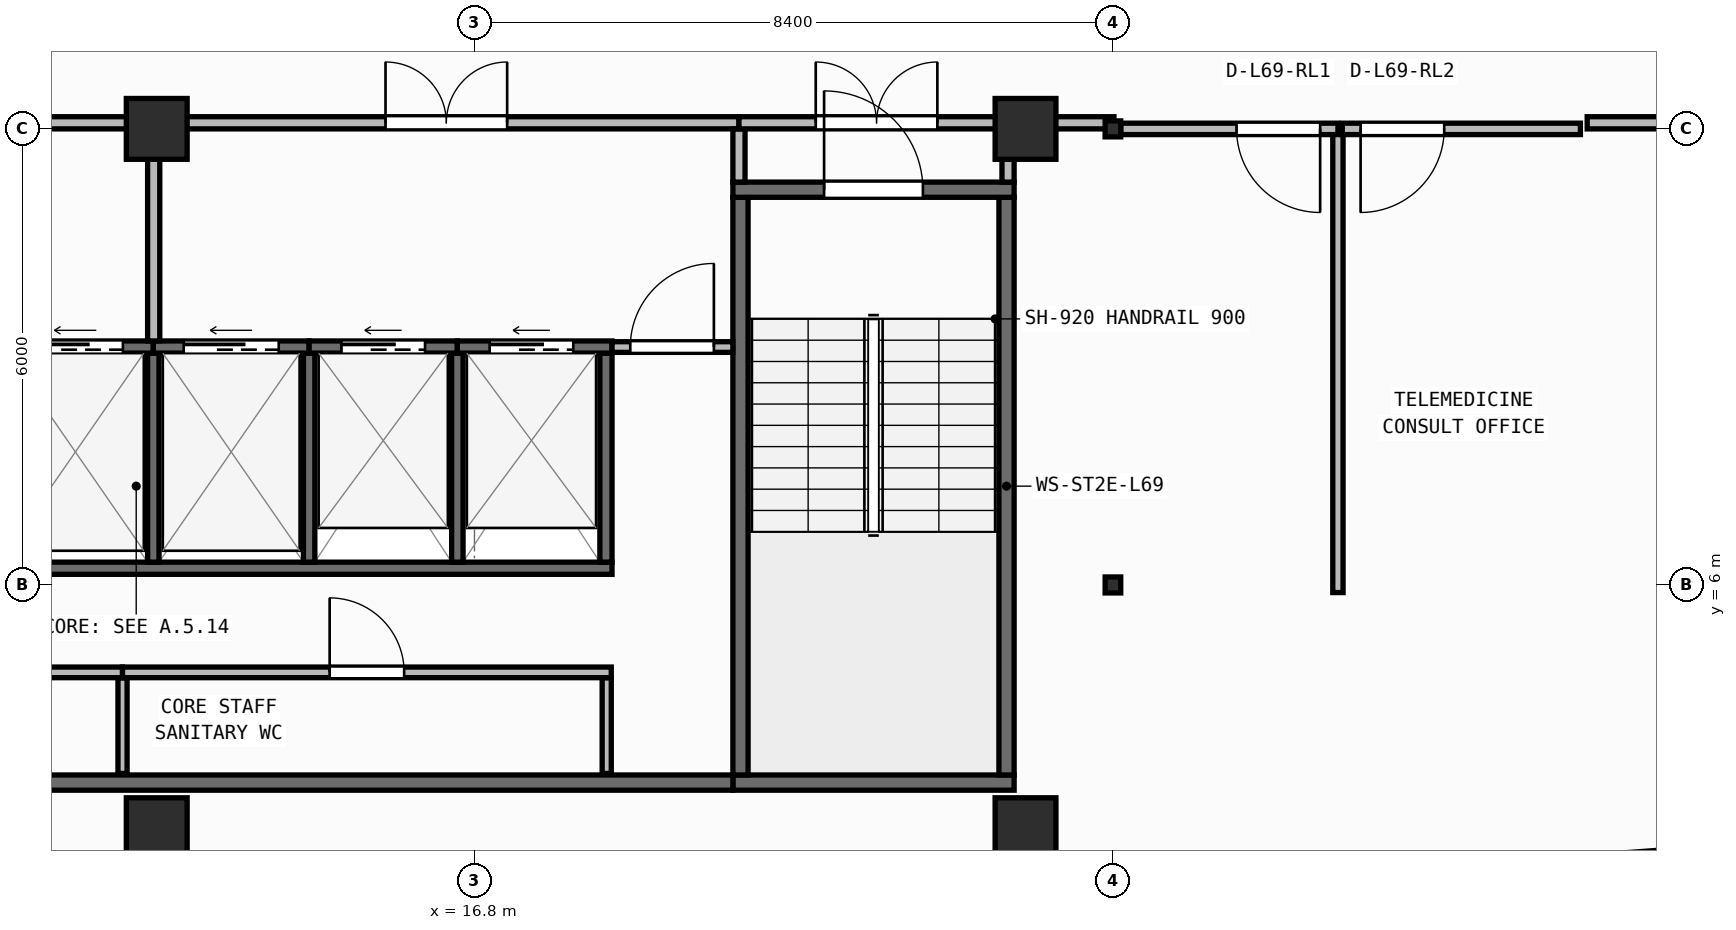
"""IFC4 building model, lengths in metres.
Left out: names, types, materials, properties, quantities, classifications, styles, units other than length and angle.
Written with IfcOpenShell. Run it as: python <this file> out.ifc"""

import sys

from ifc_helpers import new_model, si_unit, direction, frame, frame_2d, origin, origin_2d, place, context, subcontext, project, spatial, rectangle, i_section, extrude, element, fill, save


model = new_model("IFC4")
c1 = context("Model", 3, precision=1e-05, world=origin(), true_north=direction((0.0, 1.0)))
c2 = subcontext(c1, "Body", "Model", "MODEL_VIEW")
j1 = project(units=[si_unit("LENGTHUNIT", "METRE"), si_unit("PLANEANGLEUNIT", "RADIAN")], contexts=[c1])
p1 = place(None, origin())
s1 = spatial("IfcSite", under=j1, at=p1, CompositionType="ELEMENT")
p2 = place(p1, origin())
s2 = spatial("IfcBuilding", under=s1, at=p2, CompositionType="ELEMENT")
p3 = place(p2, frame((0.0, 0.0, 280.25)))
s3 = spatial("IfcBuildingStorey", under=s2, at=p3, CompositionType="ELEMENT", Elevation=280.25)
for number, where, z_axis, x_axis in (
    (1, (12.62, 2.8, 0.0), (0.0, 0.0, 1.0), (1.0, 0.0, 0.0)),
    (2, (24.05, 2.8, 0.0), (0.0, 0.0, 1.0), (1.0, 0.0, 0.0)),
):
    element("IfcColumn", number, at=place(p3, frame(where, z_axis=z_axis, x_axis=x_axis)), inside=s3, PredefinedType="COLUMN", context=c2, shape_type="SweptSolid", body=[
        extrude(rectangle(XDim=0.8, YDim=0.8, at=origin_2d()), origin(), (0.0, 0.0, 1.0), 3.95),
    ])
p4 = place(p3, frame((25.2, 6.0, 0.0), z_axis=(0.0, 0.0, 1.0), x_axis=(1.0, 0.0, 0.0)))
e3 = element("IfcColumn", 3, at=p4, inside=s3, PredefinedType="COLUMN", context=c2, shape_type="SweptSolid", body=[
    extrude(i_section(OverallWidth=0.205, OverallDepth=0.21, WebThickness=0.009, FlangeThickness=0.014, FilletRadius=0.011, at=origin_2d()), origin(), (0.0, 0.0, 1.0), 3.95),
])
for number, where, z_axis, x_axis in (
    (4, (12.62, 12.0, 0.0), (0.0, 0.0, 1.0), (1.0, 0.0, 0.0)),
    (5, (24.05, 12.0, 0.0), (0.0, 0.0, 1.0), (1.0, 0.0, 0.0)),
):
    element("IfcColumn", number, at=place(p3, frame(where, z_axis=z_axis, x_axis=x_axis)), inside=s3, PredefinedType="COLUMN", context=c2, shape_type="SweptSolid", body=[
        extrude(rectangle(XDim=0.8, YDim=0.8, at=origin_2d()), origin(), (0.0, 0.0, 1.0), 3.95),
    ])
p5 = place(p3, frame((25.2, 12.0, 0.0), z_axis=(0.0, 0.0, 1.0), x_axis=(1.0, 0.0, 0.0)))
e6 = element("IfcColumn", 6, at=p5, inside=s3, PredefinedType="COLUMN", context=c2, shape_type="SweptSolid", body=[
    extrude(i_section(OverallWidth=0.205, OverallDepth=0.21, WebThickness=0.009, FlangeThickness=0.014, FilletRadius=0.011, at=origin_2d()), origin(), (0.0, 0.0, 1.0), 3.95),
])
p6 = place(p3, frame((2.46, 0.172, 0.0), z_axis=(0.0, 0.0, 1.0), x_axis=(0.997289775118, 0.073573802713, 0.0)))
e7 = element("IfcWall", 7, at=p6, inside=s3, PredefinedType="STANDARD", context=c2, shape_type="SweptSolid", body=[
    extrude(rectangle(XDim=36.379, YDim=0.26, at=frame_2d((18.189, 0.0))), origin(), (0.0, 0.0, 1.0), 3.71),
])
p7 = place(p6, frame((16.989, 0.0, 0.9)))
e8 = element("IfcOpeningElement", 8, at=p7, cuts=e7, PredefinedType="OPENING", context=c2, shape_type="SweptSolid", body=[
    extrude(rectangle(XDim=2.4, YDim=1.65, at=frame_2d((1.2, 0.825))), frame((0.0, 0.14, 0.0), z_axis=(0.0, -1.0, 0.0), x_axis=(1.0, 0.0, 0.0)), (0.0, 0.0, 1.0), 0.28),
])
p8 = place(p3, frame((20.2, 3.4, 0.0), z_axis=(0.0, 0.0, 1.0), x_axis=(1.0, 0.0, 0.0)))
e9 = element("IfcWall", 9, at=p8, inside=s3, PredefinedType="SHEAR", context=c2, shape_type="SweptSolid", body=[
    extrude(rectangle(XDim=3.7, YDim=0.2, at=frame_2d((1.85, 0.0))), origin(), (0.0, 0.0, 1.0), 3.71),
])
for number, where, z_axis, x_axis in (
    (10, (20.3, 3.5, 0.0), (0.0, 0.0, 1.0), (0.0, 1.0, 0.0)),
    (11, (23.8, 3.5, 0.0), (0.0, 0.0, 1.0), (0.0, 1.0, 0.0)),
):
    element("IfcWall", number, at=place(p3, frame(where, z_axis=z_axis, x_axis=x_axis)), inside=s3, PredefinedType="SHEAR", context=c2, shape_type="SweptSolid", body=[
        extrude(rectangle(XDim=7.6, YDim=0.2, at=frame_2d((3.8, 0.0))), origin(), (0.0, 0.0, 1.0), 3.71),
    ])
p9 = place(p3, frame((20.2, 11.2, 0.0), z_axis=(0.0, 0.0, 1.0), x_axis=(1.0, 0.0, 0.0)))
e12 = element("IfcWall", 12, at=p9, inside=s3, PredefinedType="SHEAR", context=c2, shape_type="SweptSolid", body=[
    extrude(rectangle(XDim=3.7, YDim=0.2, at=frame_2d((1.85, 0.0))), origin(), (0.0, 0.0, 1.0), 3.71),
])
p10 = place(p9, frame((1.2, 0.0, 0.0)))
e13 = element("IfcOpeningElement", 13, at=p10, cuts=e12, PredefinedType="OPENING", context=c2, shape_type="SweptSolid", body=[
    extrude(rectangle(XDim=1.3, YDim=2.15, at=frame_2d((0.65, 1.075))), frame((0.0, 0.11, 0.0), z_axis=(0.0, -1.0, 0.0), x_axis=(1.0, 0.0, 0.0)), (0.0, 0.0, 1.0), 0.22),
])
p11 = place(p3, frame((6.5, 3.4, 0.0), z_axis=(0.0, 0.0, 1.0), x_axis=(1.0, 0.0, 0.0)))
e14 = element("IfcWall", 14, at=p11, inside=s3, PredefinedType="SHEAR", context=c2, shape_type="SweptSolid", body=[
    extrude(rectangle(XDim=13.7, YDim=0.2, at=frame_2d((6.85, 0.0))), origin(), (0.0, 0.0, 1.0), 3.71),
])
p12 = place(p3, frame((6.5, 6.22, 0.0), z_axis=(0.0, 0.0, 1.0), x_axis=(1.0, 0.0, 0.0)))
e15 = element("IfcWall", 15, at=p12, inside=s3, PredefinedType="SHEAR", context=c2, shape_type="SweptSolid", body=[
    extrude(rectangle(XDim=12.11, YDim=0.16, at=frame_2d((6.055, 0.0))), origin(), (0.0, 0.0, 1.0), 3.71),
])
p13 = place(p3, frame((18.53, 6.3, 0.0), z_axis=(0.0, 0.0, 1.0), x_axis=(0.0, 1.0, 0.0)))
e16 = element("IfcWall", 16, at=p13, inside=s3, PredefinedType="SHEAR", context=c2, shape_type="SweptSolid", body=[
    extrude(rectangle(XDim=2.75, YDim=0.16, at=frame_2d((1.375, 0.0))), origin(), (0.0, 0.0, 1.0), 3.71),
])
for number, where, z_axis, x_axis in (
    (17, (12.575, 6.3, 0.0), (0.0, 0.0, 1.0), (0.0, 1.0, 0.0)),
    (18, (14.625, 6.3, 0.0), (0.0, 0.0, 1.0), (0.0, 1.0, 0.0)),
    (19, (16.575, 6.3, 0.0), (0.0, 0.0, 1.0), (0.0, 1.0, 0.0)),
):
    element("IfcWall", number, at=place(p3, frame(where, z_axis=z_axis, x_axis=x_axis)), inside=s3, PredefinedType="SHEAR", context=c2, shape_type="SweptSolid", body=[
        extrude(rectangle(XDim=2.75, YDim=0.15, at=frame_2d((1.375, 0.0))), origin(), (0.0, 0.0, 1.0), 3.71),
    ])
p14 = place(p3, frame((10.525, 9.13, 0.0), z_axis=(0.0, 0.0, 1.0), x_axis=(1.0, 0.0, 0.0)))
e20 = element("IfcWall", 20, at=p14, inside=s3, PredefinedType="SHEAR", context=c2, shape_type="SweptSolid", body=[
    extrude(rectangle(XDim=2.05, YDim=0.16, at=frame_2d((1.025, 0.0))), origin(), (0.0, 0.0, 1.0), 3.71),
])
p15 = place(p14, frame((0.4, 0.0, 0.0)))
e21 = element("IfcOpeningElement", 21, at=p15, cuts=e20, PredefinedType="OPENING", context=c2, shape_type="SweptSolid", body=[
    extrude(rectangle(XDim=1.25, YDim=2.15, at=frame_2d((0.625, 1.075))), frame((0.0, 0.09, 0.0), z_axis=(0.0, -1.0, 0.0), x_axis=(1.0, 0.0, 0.0)), (0.0, 0.0, 1.0), 0.18),
])
p16 = place(p3, frame((12.575, 9.13, 0.0), z_axis=(0.0, 0.0, 1.0), x_axis=(1.0, 0.0, 0.0)))
e22 = element("IfcWall", 22, at=p16, inside=s3, PredefinedType="SHEAR", context=c2, shape_type="SweptSolid", body=[
    extrude(rectangle(XDim=2.05, YDim=0.16, at=frame_2d((1.025, 0.0))), origin(), (0.0, 0.0, 1.0), 3.71),
])
p17 = place(p16, frame((0.4, 0.0, 0.0)))
e23 = element("IfcOpeningElement", 23, at=p17, cuts=e22, PredefinedType="OPENING", context=c2, shape_type="SweptSolid", body=[
    extrude(rectangle(XDim=1.25, YDim=2.15, at=frame_2d((0.625, 1.075))), frame((0.0, 0.09, 0.0), z_axis=(0.0, -1.0, 0.0), x_axis=(1.0, 0.0, 0.0)), (0.0, 0.0, 1.0), 0.18),
])
p18 = place(p3, frame((14.625, 9.13, 0.0), z_axis=(0.0, 0.0, 1.0), x_axis=(1.0, 0.0, 0.0)))
e24 = element("IfcWall", 24, at=p18, inside=s3, PredefinedType="SHEAR", context=c2, shape_type="SweptSolid", body=[
    extrude(rectangle(XDim=1.95, YDim=0.16, at=frame_2d((0.975, 0.0))), origin(), (0.0, 0.0, 1.0), 3.71),
])
p19 = place(p18, frame((0.425, 0.0, 0.0)))
e25 = element("IfcOpeningElement", 25, at=p19, cuts=e24, PredefinedType="OPENING", context=c2, shape_type="SweptSolid", body=[
    extrude(rectangle(XDim=1.1, YDim=2.15, at=frame_2d((0.55, 1.075))), frame((0.0, 0.09, 0.0), z_axis=(0.0, -1.0, 0.0), x_axis=(1.0, 0.0, 0.0)), (0.0, 0.0, 1.0), 0.18),
])
p20 = place(p3, frame((16.575, 9.13, 0.0), z_axis=(0.0, 0.0, 1.0), x_axis=(1.0, 0.0, 0.0)))
e26 = element("IfcWall", 26, at=p20, inside=s3, PredefinedType="SHEAR", context=c2, shape_type="SweptSolid", body=[
    extrude(rectangle(XDim=2.035, YDim=0.16, at=frame_2d((1.018, 0.0))), origin(), (0.0, 0.0, 1.0), 3.71),
])
p21 = place(p20, frame((0.425, 0.0, 0.0)))
e27 = element("IfcOpeningElement", 27, at=p21, cuts=e26, PredefinedType="OPENING", context=c2, shape_type="SweptSolid", body=[
    extrude(rectangle(XDim=1.1, YDim=2.15, at=frame_2d((0.55, 1.075))), frame((0.0, 0.09, 0.0), z_axis=(0.0, -1.0, 0.0), x_axis=(1.0, 0.0, 0.0)), (0.0, 0.0, 1.0), 0.18),
])
for number, where, z_axis, x_axis in (
    (28, (12.17, 3.52, 0.0), (0.0, 0.0, 1.0), (0.0, 1.0, 0.0)),
    (29, (18.54, 3.52, 0.0), (0.0, 0.0, 1.0), (0.0, 1.0, 0.0)),
):
    element("IfcWall", number, at=place(p3, frame(where, z_axis=z_axis, x_axis=x_axis)), inside=s3, PredefinedType="PARTITIONING", context=c2, shape_type="SweptSolid", body=[
        extrude(rectangle(XDim=1.26, YDim=0.12, at=frame_2d((0.63, 0.0))), origin(), (0.0, 0.0, 1.0), 3.71),
    ])
p22 = place(p3, frame((6.5, 4.85, 0.0), z_axis=(0.0, 0.0, 1.0), x_axis=(1.0, 0.0, 0.0)))
e30 = element("IfcWall", 30, at=p22, inside=s3, PredefinedType="PARTITIONING", context=c2, shape_type="SweptSolid", body=[
    extrude(rectangle(XDim=5.67, YDim=0.14, at=frame_2d((2.835, 0.0))), origin(), (0.0, 0.0, 1.0), 3.71),
])
p23 = place(p22, frame((2.285, 0.0, 0.0)))
e31 = element("IfcOpeningElement", 31, at=p23, cuts=e30, PredefinedType="OPENING", context=c2, shape_type="SweptSolid", body=[
    extrude(rectangle(XDim=1.1, YDim=2.1, at=frame_2d((0.55, 1.05))), frame((0.0, 0.08, 0.0), z_axis=(0.0, -1.0, 0.0), x_axis=(1.0, 0.0, 0.0)), (0.0, 0.0, 1.0), 0.16),
])
p24 = place(p3, frame((12.17, 4.85, 0.0), z_axis=(0.0, 0.0, 1.0), x_axis=(1.0, 0.0, 0.0)))
e32 = element("IfcWall", 32, at=p24, inside=s3, PredefinedType="PARTITIONING", context=c2, shape_type="SweptSolid", body=[
    extrude(rectangle(XDim=6.43, YDim=0.14, at=frame_2d((3.215, 0.0))), origin(), (0.0, 0.0, 1.0), 3.71),
])
p25 = place(p24, frame((2.725, 0.0, 0.0)))
e33 = element("IfcOpeningElement", 33, at=p25, cuts=e32, PredefinedType="OPENING", context=c2, shape_type="SweptSolid", body=[
    extrude(rectangle(XDim=0.98, YDim=2.1, at=frame_2d((0.49, 1.05))), frame((0.0, 0.08, 0.0), z_axis=(0.0, -1.0, 0.0), x_axis=(1.0, 0.0, 0.0)), (0.0, 0.0, 1.0), 0.16),
])
p26 = place(p3, frame((18.61, 9.13, 0.0), z_axis=(0.0, 0.0, 1.0), x_axis=(1.0, 0.0, 0.0)))
e34 = element("IfcWall", 34, at=p26, inside=s3, PredefinedType="PARTITIONING", context=c2, shape_type="SweptSolid", body=[
    extrude(rectangle(XDim=1.59, YDim=0.14, at=frame_2d((0.795, 0.0))), origin(), (0.0, 0.0, 1.0), 3.71),
])
p27 = place(p26, frame((0.24, 0.0, 0.0)))
e35 = element("IfcOpeningElement", 35, at=p27, cuts=e34, PredefinedType="OPENING", context=c2, shape_type="SweptSolid", body=[
    extrude(rectangle(XDim=1.1, YDim=2.1, at=frame_2d((0.55, 1.05))), frame((0.0, 0.08, 0.0), z_axis=(0.0, -1.0, 0.0), x_axis=(1.0, 0.0, 0.0)), (0.0, 0.0, 1.0), 0.16),
])
p28 = place(p3, frame((6.4, 12.08, 0.0), z_axis=(0.0, 0.0, 1.0), x_axis=(1.0, 0.0, 0.0)))
e36 = element("IfcWall", 36, at=p28, inside=s3, PredefinedType="PARTITIONING", context=c2, shape_type="SweptSolid", body=[
    extrude(rectangle(XDim=6.18, YDim=0.16, at=frame_2d((3.09, 0.0))), origin(), (0.0, 0.0, 1.0), 3.157),
])
p29 = place(p28, frame((2.29, 0.0, 0.0)))
e37 = element("IfcOpeningElement", 37, at=p29, cuts=e36, PredefinedType="OPENING", context=c2, shape_type="SweptSolid", body=[
    extrude(rectangle(XDim=1.6, YDim=2.05, at=frame_2d((0.8, 1.025))), frame((0.0, 0.09, 0.0), z_axis=(0.0, -1.0, 0.0), x_axis=(1.0, 0.0, 0.0)), (0.0, 0.0, 1.0), 0.18),
])
p30 = place(p3, frame((12.58, 9.21, 0.0), z_axis=(0.0, 0.0, 1.0), x_axis=(0.0, 1.0, 0.0)))
e38 = element("IfcWall", 38, at=p30, inside=s3, PredefinedType="PARTITIONING", context=c2, shape_type="SweptSolid", body=[
    extrude(rectangle(XDim=2.79, YDim=0.16, at=frame_2d((1.395, 0.0))), origin(), (0.0, 0.0, 1.0), 3.71),
])
p31 = place(p3, frame((12.58, 12.08, 0.0), z_axis=(0.0, 0.0, 1.0), x_axis=(1.0, 0.0, 0.0)))
e39 = element("IfcWall", 39, at=p31, inside=s3, PredefinedType="PARTITIONING", context=c2, shape_type="SweptSolid", body=[
    extrude(rectangle(XDim=7.7, YDim=0.16, at=frame_2d((3.85, 0.0))), origin(), (0.0, 0.0, 1.0), 3.157),
])
p32 = place(p31, frame((3.05, 0.0, 0.0)))
e40 = element("IfcOpeningElement", 40, at=p32, cuts=e39, PredefinedType="OPENING", context=c2, shape_type="SweptSolid", body=[
    extrude(rectangle(XDim=1.6, YDim=2.05, at=frame_2d((0.8, 1.025))), frame((0.0, 0.09, 0.0), z_axis=(0.0, -1.0, 0.0), x_axis=(1.0, 0.0, 0.0)), (0.0, 0.0, 1.0), 0.18),
])
p33 = place(p3, frame((20.28, 11.3, 0.0), z_axis=(0.0, 0.0, 1.0), x_axis=(0.0, 1.0, 0.0)))
e41 = element("IfcWall", 41, at=p33, inside=s3, PredefinedType="PARTITIONING", context=c2, shape_type="SweptSolid", body=[
    extrude(rectangle(XDim=0.7, YDim=0.16, at=frame_2d((0.35, 0.0))), origin(), (0.0, 0.0, 1.0), 3.71),
])
p34 = place(p3, frame((20.28, 12.08, 0.0), z_axis=(0.0, 0.0, 1.0), x_axis=(1.0, 0.0, 0.0)))
e42 = element("IfcWall", 42, at=p34, inside=s3, PredefinedType="PARTITIONING", context=c2, shape_type="SweptSolid", body=[
    extrude(rectangle(XDim=3.62, YDim=0.16, at=frame_2d((1.81, 0.0))), origin(), (0.0, 0.0, 1.0), 3.157),
])
p35 = place(p34, frame((1.01, 0.0, 0.0)))
e43 = element("IfcOpeningElement", 43, at=p35, cuts=e42, PredefinedType="OPENING", context=c2, shape_type="SweptSolid", body=[
    extrude(rectangle(XDim=1.6, YDim=2.05, at=frame_2d((0.8, 1.025))), frame((0.0, 0.09, 0.0), z_axis=(0.0, -1.0, 0.0), x_axis=(1.0, 0.0, 0.0)), (0.0, 0.0, 1.0), 0.18),
])
p36 = place(p3, frame((23.82, 11.3, 0.0), z_axis=(0.0, 0.0, 1.0), x_axis=(0.0, 1.0, 0.0)))
e44 = element("IfcWall", 44, at=p36, inside=s3, PredefinedType="PARTITIONING", context=c2, shape_type="SweptSolid", body=[
    extrude(rectangle(XDim=0.7, YDim=0.16, at=frame_2d((0.35, 0.0))), origin(), (0.0, 0.0, 1.0), 3.71),
])
p37 = place(p3, frame((28.16, 5.9, 0.0), z_axis=(0.0, 0.0, 1.0), x_axis=(0.0, 1.0, 0.0)))
e45 = element("IfcWall", 45, at=p37, inside=s3, PredefinedType="PARTITIONING", context=c2, shape_type="SweptSolid", body=[
    extrude(rectangle(XDim=6.1, YDim=0.135, at=frame_2d((3.05, 0.0))), origin(), (0.0, 0.0, 1.0), 3.71),
])
p38 = place(p3, frame((28.16, 12.0, 0.0), z_axis=(0.0, 0.0, 1.0), x_axis=(-1.0, 0.0, 0.0)))
e46 = element("IfcWall", 46, at=p38, inside=s3, PredefinedType="PARTITIONING", context=c2, shape_type="SweptSolid", body=[
    extrude(rectangle(XDim=2.857, YDim=0.15, at=frame_2d((1.429, 0.0))), origin(), (0.0, 0.0, 1.0), 3.157),
])
p39 = place(p38, frame((0.234, 0.0, 0.0)))
e47 = element("IfcOpeningElement", 47, at=p39, cuts=e46, PredefinedType="OPENING", context=c2, shape_type="SweptSolid", body=[
    extrude(rectangle(XDim=1.1, YDim=2.1, at=frame_2d((0.55, 1.05))), frame((0.0, 0.085, 0.0), z_axis=(0.0, -1.0, 0.0), x_axis=(1.0, 0.0, 0.0)), (0.0, 0.0, 1.0), 0.17),
])
p40 = place(p3, frame((31.35, 12.0, 0.0), z_axis=(0.0, 0.0, 1.0), x_axis=(-1.0, 0.0, 0.0)))
e48 = element("IfcWall", 48, at=p40, inside=s3, PredefinedType="PARTITIONING", context=c2, shape_type="SweptSolid", body=[
    extrude(rectangle(XDim=3.133, YDim=0.15, at=frame_2d((1.566, 0.0))), origin(), (0.0, 0.0, 1.0), 3.157),
])
p41 = place(p40, frame((1.792, 0.0, 0.0)))
e49 = element("IfcOpeningElement", 49, at=p41, cuts=e48, PredefinedType="OPENING", context=c2, shape_type="SweptSolid", body=[
    extrude(rectangle(XDim=1.1, YDim=2.1, at=frame_2d((0.55, 1.05))), frame((0.0, 0.085, 0.0), z_axis=(0.0, -1.0, 0.0), x_axis=(1.0, 0.0, 0.0)), (0.0, 0.0, 1.0), 0.17),
])
p42 = place(p3, frame((24.02, 12.08, 0.0), z_axis=(0.0, 0.0, 1.0), x_axis=(1.0, 0.0, 0.0)))
e50 = element("IfcWall", 50, at=p42, inside=s3, PredefinedType="PARTITIONING", context=c2, shape_type="SweptSolid", body=[
    extrude(rectangle(XDim=1.193, YDim=0.16, at=frame_2d((0.597, 0.0))), origin(), (0.0, 0.0, 1.0), 3.157),
])
p43 = place(p3, frame((31.439, 12.08, 0.0), z_axis=(0.0, 0.0, 1.0), x_axis=(1.0, 0.0, 0.0)))
e51 = element("IfcWall", 51, at=p43, inside=s3, PredefinedType="PARTITIONING", context=c2, shape_type="SweptSolid", body=[
    extrude(rectangle(XDim=2.174, YDim=0.16, at=frame_2d((1.087, 0.0))), origin(), (0.0, 0.0, 1.0), 3.157),
])
p44 = place(p10, origin())
e52 = element("IfcDoor", 52, at=p44, inside=s3, OperationType="SINGLE_SWING_LEFT", PredefinedType="DOOR", context=c2, shape_type="SweptSolid", body=[
    extrude(rectangle(XDim=1.3, YDim=2.15, at=frame_2d((0.65, 1.075))), frame((0.0, 0.025, 0.0), z_axis=(0.0, -1.0, 0.0), x_axis=(1.0, 0.0, 0.0)), (0.0, 0.0, 1.0), 0.05),
])
fill(e13, e52)
p45 = place(p15, origin())
e53 = element("IfcDoor", 53, at=p45, inside=s3, OperationType="SLIDING_TO_LEFT", PredefinedType="DOOR", context=c2, shape_type="SweptSolid", body=[
    extrude(rectangle(XDim=1.25, YDim=2.15, at=frame_2d((0.625, 1.075))), frame((0.0, 0.025, 0.0), z_axis=(0.0, -1.0, 0.0), x_axis=(1.0, 0.0, 0.0)), (0.0, 0.0, 1.0), 0.05),
])
fill(e21, e53)
p46 = place(p17, origin())
e54 = element("IfcDoor", 54, at=p46, inside=s3, OperationType="SLIDING_TO_LEFT", PredefinedType="DOOR", context=c2, shape_type="SweptSolid", body=[
    extrude(rectangle(XDim=1.25, YDim=2.15, at=frame_2d((0.625, 1.075))), frame((0.0, 0.025, 0.0), z_axis=(0.0, -1.0, 0.0), x_axis=(1.0, 0.0, 0.0)), (0.0, 0.0, 1.0), 0.05),
])
fill(e23, e54)
p47 = place(p19, origin())
e55 = element("IfcDoor", 55, at=p47, inside=s3, OperationType="SLIDING_TO_LEFT", PredefinedType="DOOR", context=c2, shape_type="SweptSolid", body=[
    extrude(rectangle(XDim=1.1, YDim=2.15, at=frame_2d((0.55, 1.075))), frame((0.0, 0.025, 0.0), z_axis=(0.0, -1.0, 0.0), x_axis=(1.0, 0.0, 0.0)), (0.0, 0.0, 1.0), 0.05),
])
fill(e25, e55)
p48 = place(p21, origin())
e56 = element("IfcDoor", 56, at=p48, inside=s3, OperationType="SLIDING_TO_LEFT", PredefinedType="DOOR", context=c2, shape_type="SweptSolid", body=[
    extrude(rectangle(XDim=1.1, YDim=2.15, at=frame_2d((0.55, 1.075))), frame((0.0, 0.025, 0.0), z_axis=(0.0, -1.0, 0.0), x_axis=(1.0, 0.0, 0.0)), (0.0, 0.0, 1.0), 0.05),
])
fill(e27, e56)
p49 = place(p25, origin())
e57 = element("IfcDoor", 57, at=p49, inside=s3, OperationType="SINGLE_SWING_LEFT", PredefinedType="DOOR", context=c2, shape_type="SweptSolid", body=[
    extrude(rectangle(XDim=0.98, YDim=2.1, at=frame_2d((0.49, 1.05))), frame((0.0, 0.025, 0.0), z_axis=(0.0, -1.0, 0.0), x_axis=(1.0, 0.0, 0.0)), (0.0, 0.0, 1.0), 0.05),
])
fill(e33, e57)
p50 = place(p27, origin())
e58 = element("IfcDoor", 58, at=p50, inside=s3, OperationType="SINGLE_SWING_RIGHT", PredefinedType="DOOR", context=c2, shape_type="SweptSolid", body=[
    extrude(rectangle(XDim=1.1, YDim=2.1, at=frame_2d((0.55, 1.05))), frame((0.0, 0.025, 0.0), z_axis=(0.0, -1.0, 0.0), x_axis=(1.0, 0.0, 0.0)), (0.0, 0.0, 1.0), 0.05),
])
fill(e35, e58)
p51 = place(p32, origin())
e59 = element("IfcDoor", 59, at=p51, inside=s3, OperationType="DOUBLE_DOOR_SINGLE_SWING", PredefinedType="DOOR", context=c2, shape_type="SweptSolid", body=[
    extrude(rectangle(XDim=1.6, YDim=2.05, at=frame_2d((0.8, 1.025))), frame((0.0, 0.025, 0.0), z_axis=(0.0, -1.0, 0.0), x_axis=(1.0, 0.0, 0.0)), (0.0, 0.0, 1.0), 0.05),
])
fill(e40, e59)
p52 = place(p35, origin())
e60 = element("IfcDoor", 60, at=p52, inside=s3, OperationType="DOUBLE_DOOR_SINGLE_SWING", PredefinedType="DOOR", context=c2, shape_type="SweptSolid", body=[
    extrude(rectangle(XDim=1.6, YDim=2.05, at=frame_2d((0.8, 1.025))), frame((0.0, 0.025, 0.0), z_axis=(0.0, -1.0, 0.0), x_axis=(1.0, 0.0, 0.0)), (0.0, 0.0, 1.0), 0.05),
])
fill(e43, e60)
p53 = place(p39, origin())
e61 = element("IfcDoor", 61, at=p53, inside=s3, OperationType="SINGLE_SWING_LEFT", PredefinedType="DOOR", context=c2, shape_type="SweptSolid", body=[
    extrude(rectangle(XDim=1.1, YDim=2.1, at=frame_2d((0.55, 1.05))), frame((0.0, 0.025, 0.0), z_axis=(0.0, -1.0, 0.0), x_axis=(1.0, 0.0, 0.0)), (0.0, 0.0, 1.0), 0.05),
])
fill(e47, e61)
p54 = place(p41, origin())
e62 = element("IfcDoor", 62, at=p54, inside=s3, OperationType="SINGLE_SWING_RIGHT", PredefinedType="DOOR", context=c2, shape_type="SweptSolid", body=[
    extrude(rectangle(XDim=1.1, YDim=2.1, at=frame_2d((0.55, 1.05))), frame((0.0, 0.025, 0.0), z_axis=(0.0, -1.0, 0.0), x_axis=(1.0, 0.0, 0.0)), (0.0, 0.0, 1.0), 0.05),
])
fill(e49, e62)
save(model, sys.argv[1])
